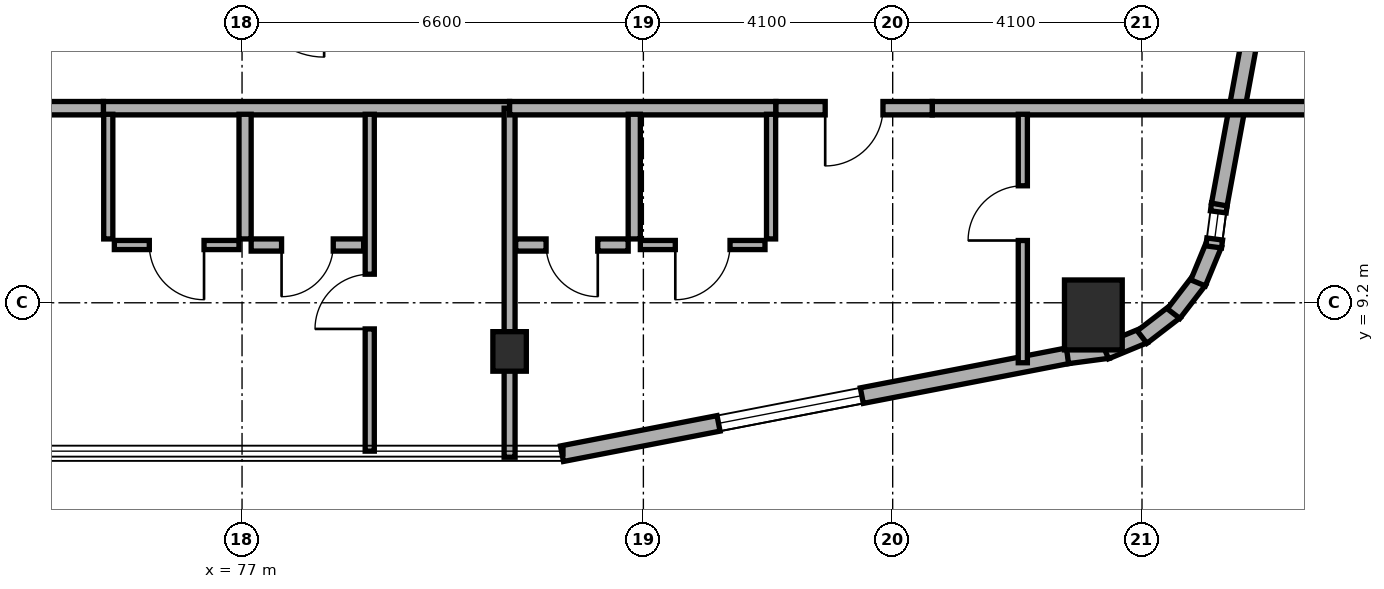
"""IFC4 building model, lengths in metres.
Left out: names, types, materials, properties, quantities, classifications, styles, units other than length and angle.
Written with IfcOpenShell. Run it as: python <this file> out.ifc"""

import sys

from ifc_helpers import new_model, si_unit, direction, frame, frame_2d, origin, origin_2d, place, context, subcontext, project, spatial, rectangle, extrude, element, fill, save


model = new_model("IFC4")
c1 = context("Model", 3, precision=1e-05, world=origin(), true_north=direction((0.0, 1.0)))
c2 = subcontext(c1, "Body", "Model", "MODEL_VIEW")
j1 = project(units=[si_unit("LENGTHUNIT", "METRE"), si_unit("PLANEANGLEUNIT", "RADIAN")], contexts=[c1])
p1 = place(None, origin())
s1 = spatial("IfcSite", under=j1, at=p1, CompositionType="ELEMENT")
p2 = place(p1, origin())
s2 = spatial("IfcBuilding", under=s1, at=p2, CompositionType="ELEMENT")
p3 = place(p2, frame((0.0, 0.0, 127.5)))
s3 = spatial("IfcBuildingStorey", under=s2, at=p3, CompositionType="ELEMENT", Elevation=127.5)
p4 = place(p3, frame((81.4, 8.4, 0.0), z_axis=(0.0, 0.0, 1.0), x_axis=(1.0, 0.0, 0.0)))
e1 = element("IfcColumn", 1, at=p4, inside=s3, PredefinedType="COLUMN", context=c2, shape_type="SweptSolid", body=[
    extrude(rectangle(XDim=0.55, YDim=0.65, at=origin_2d()), origin(), (0.0, 0.0, 1.0), 3.24),
])
p5 = place(p3, frame((91.0, 9.0, 0.0), z_axis=(0.0, 0.0, 1.0), x_axis=(1.0, 0.0, 0.0)))
e2 = element("IfcColumn", 2, at=p5, inside=s3, PredefinedType="COLUMN", context=c2, shape_type="SweptSolid", body=[
    extrude(rectangle(XDim=0.95, YDim=1.15, at=origin_2d()), origin(), (0.0, 0.0, 1.0), 3.24),
])
p6 = place(p3, frame((82.261, 6.718, 0.0), z_axis=(0.0, 0.0, 1.0), x_axis=(0.981750199588, 0.190175039396, 0.0)))
e3 = element("IfcWall", 3, at=p6, inside=s3, PredefinedType="STANDARD", context=c2, shape_type="SweptSolid", body=[
    extrude(rectangle(XDim=8.477, YDim=0.26, at=frame_2d((4.238, 0.0))), origin(), (0.0, 0.0, 1.0), 3.25),
])
p7 = place(p6, frame((2.623, 0.0, 0.8)))
e4 = element("IfcOpeningElement", 4, at=p7, cuts=e3, PredefinedType="OPENING", context=c2, shape_type="SweptSolid", body=[
    extrude(rectangle(XDim=2.4, YDim=1.6, at=frame_2d((1.2, 0.8))), frame((0.0, 0.14, 0.0), z_axis=(0.0, -1.0, 0.0), x_axis=(1.0, 0.0, 0.0)), (0.0, 0.0, 1.0), 0.28),
])
p8 = place(p3, frame((90.575, 8.328, 0.0), z_axis=(0.0, 0.0, 1.0), x_axis=(0.991300187529, 0.13162043232, 0.0)))
e5 = element("IfcWall", 5, at=p8, inside=s3, PredefinedType="STANDARD", context=c2, shape_type="SweptSolid", body=[
    extrude(rectangle(XDim=0.677, YDim=0.26, at=frame_2d((0.338, 0.0))), origin(), (0.0, 0.0, 1.0), 3.25),
])
for number, where, z_axis, x_axis in (
    (6, (91.2, 8.399, 0.0), (0.0, 0.0, 1.0), (0.924, 0.382, 0.0)),
    (7, (91.801, 8.636, 0.0), (0.0, 0.0, 1.0), (0.793, 0.61, 0.0)),
    (8, (92.32, 9.021, 0.0), (0.0, 0.0, 1.0), (0.609, 0.793, 0.0)),
):
    element("IfcWall", number, at=place(p3, frame(where, z_axis=z_axis, x_axis=x_axis)), inside=s3, PredefinedType="STANDARD", context=c2, shape_type="SweptSolid", body=[
        extrude(rectangle(XDim=0.694, YDim=0.26, at=frame_2d((0.347, 0.0))), origin(), (0.0, 0.0, 1.0), 3.25),
    ])
p9 = place(p3, frame((92.722, 9.527, 0.0), z_axis=(0.0, 0.0, 1.0), x_axis=(0.382289608286, 0.924042561464, 0.0)))
e9 = element("IfcWall", 9, at=p9, inside=s3, PredefinedType="STANDARD", context=c2, shape_type="SweptSolid", body=[
    extrude(rectangle(XDim=0.694, YDim=0.26, at=frame_2d((0.347, 0.0))), origin(), (0.0, 0.0, 1.0), 3.25),
])
p10 = place(p3, frame((92.979, 10.119, 0.0), z_axis=(0.0, 0.0, 1.0), x_axis=(0.130614135366, 0.991433279471, 0.0)))
e10 = element("IfcWall", 10, at=p10, inside=s3, PredefinedType="STANDARD", context=c2, shape_type="SweptSolid", body=[
    extrude(rectangle(XDim=0.712, YDim=0.26, at=frame_2d((0.356, 0.0))), origin(), (0.0, 0.0, 1.0), 3.25),
])
p11 = place(p10, frame((0.131, 0.0, 0.85)))
e11 = element("IfcOpeningElement", 11, at=p11, cuts=e10, PredefinedType="OPENING", context=c2, shape_type="SweptSolid", body=[
    extrude(rectangle(XDim=0.45, YDim=1.5, at=frame_2d((0.225, 0.75))), frame((0.0, 0.14, 0.0), z_axis=(0.0, -1.0, 0.0), x_axis=(1.0, 0.0, 0.0)), (0.0, 0.0, 1.0), 0.28),
])
p12 = place(p3, frame((93.071, 10.816, 0.0), z_axis=(0.0, 0.0, 1.0), x_axis=(0.181209963057, 0.983444431215, 0.0)))
e12 = element("IfcWall", 12, at=p12, inside=s3, PredefinedType="STANDARD", context=c2, shape_type="SweptSolid", body=[
    extrude(rectangle(XDim=8.889, YDim=0.26, at=frame_2d((4.445, 0.0))), origin(), (0.0, 0.0, 1.0), 3.25),
])
p13 = place(p12, frame((5.045, 0.0, 0.8)))
e13 = element("IfcOpeningElement", 13, at=p13, cuts=e12, PredefinedType="OPENING", context=c2, shape_type="SweptSolid", body=[
    extrude(rectangle(XDim=2.4, YDim=1.6, at=frame_2d((1.2, 0.8))), frame((0.0, 0.14, 0.0), z_axis=(0.0, -1.0, 0.0), x_axis=(1.0, 0.0, 0.0)), (0.0, 0.0, 1.0), 0.28),
])
p14 = place(p3, frame((74.72, 12.4, 0.0), z_axis=(0.0, 0.0, 1.0), x_axis=(1.0, 0.0, 0.0)))
e14 = element("IfcWall", 14, at=p14, inside=s3, PredefinedType="SOLIDWALL", context=c2, shape_type="SweptSolid", body=[
    extrude(rectangle(XDim=6.68, YDim=0.22, at=frame_2d((3.34, 0.0))), origin(), (0.0, 0.0, 1.0), 3.22),
])
p15 = place(p3, frame((65.85, 12.4, 0.0), z_axis=(0.0, 0.0, 1.0), x_axis=(1.0, 0.0, 0.0)))
e15 = element("IfcWall", 15, at=p15, inside=s3, PredefinedType="SOLIDWALL", context=c2, shape_type="SweptSolid", body=[
    extrude(rectangle(XDim=8.87, YDim=0.22, at=frame_2d((4.435, 0.0))), origin(), (0.0, 0.0, 1.0), 3.22),
])
p16 = place(p15, frame((3.96, 0.0, 0.0)))
e16 = element("IfcOpeningElement", 16, at=p16, cuts=e15, PredefinedType="OPENING", context=c2, shape_type="SweptSolid", body=[
    extrude(rectangle(XDim=0.95, YDim=2.1, at=frame_2d((0.475, 1.05))), frame((0.0, 0.12, 0.0), z_axis=(0.0, -1.0, 0.0), x_axis=(1.0, 0.0, 0.0)), (0.0, 0.0, 1.0), 0.24),
])
p17 = place(p3, frame((79.1, 6.76, 0.0), z_axis=(0.0, 0.0, 1.0), x_axis=(0.0, 1.0, 0.0)))
e17 = element("IfcWall", 17, at=p17, inside=s3, PredefinedType="PARTITIONING", context=c2, shape_type="SweptSolid", body=[
    extrude(rectangle(XDim=5.54, YDim=0.15, at=frame_2d((2.77, 0.0))), origin(), (0.0, 0.0, 1.0), 3.22),
])
p18 = place(p17, frame((2.01, 0.0, 0.0)))
e18 = element("IfcOpeningElement", 18, at=p18, cuts=e17, PredefinedType="OPENING", context=c2, shape_type="SweptSolid", body=[
    extrude(rectangle(XDim=0.9, YDim=2.1, at=frame_2d((0.45, 1.05))), frame((0.0, 0.085, 0.0), z_axis=(0.0, -1.0, 0.0), x_axis=(1.0, 0.0, 0.0)), (0.0, 0.0, 1.0), 0.17),
])
p19 = place(p3, frame((77.05, 10.25, 0.0), z_axis=(0.0, 0.0, 1.0), x_axis=(0.0, 1.0, 0.0)))
e19 = element("IfcWall", 19, at=p19, inside=s3, PredefinedType="PLUMBINGWALL", context=c2, shape_type="SweptSolid", body=[
    extrude(rectangle(XDim=2.05, YDim=0.2, at=frame_2d((1.025, 0.0))), origin(), (0.0, 0.0, 1.0), 3.22),
])
p20 = place(p3, frame((74.8, 10.25, 0.0), z_axis=(0.0, 0.0, 1.0), x_axis=(0.0, 1.0, 0.0)))
e20 = element("IfcWall", 20, at=p20, inside=s3, PredefinedType="PARTITIONING", context=c2, shape_type="SweptSolid", body=[
    extrude(rectangle(XDim=2.05, YDim=0.15, at=frame_2d((1.025, 0.0))), origin(), (0.0, 0.0, 1.0), 3.22),
])
p21 = place(p3, frame((77.15, 10.15, 0.0), z_axis=(0.0, 0.0, 1.0), x_axis=(1.0, 0.0, 0.0)))
e21 = element("IfcWall", 21, at=p21, inside=s3, PredefinedType="PLUMBINGWALL", context=c2, shape_type="SweptSolid", body=[
    extrude(rectangle(XDim=1.85, YDim=0.2, at=frame_2d((0.925, 0.0))), origin(), (0.0, 0.0, 1.0), 3.22),
])
p22 = place(p21, frame((0.5, 0.0, 0.0)))
e22 = element("IfcOpeningElement", 22, at=p22, cuts=e21, PredefinedType="OPENING", context=c2, shape_type="SweptSolid", body=[
    extrude(rectangle(XDim=0.85, YDim=2.1, at=frame_2d((0.425, 1.05))), frame((0.0, 0.11, 0.0), z_axis=(0.0, -1.0, 0.0), x_axis=(1.0, 0.0, 0.0)), (0.0, 0.0, 1.0), 0.22),
])
p23 = place(p3, frame((74.9, 10.15, 0.0), z_axis=(0.0, 0.0, 1.0), x_axis=(1.0, 0.0, 0.0)))
e23 = element("IfcWall", 23, at=p23, inside=s3, PredefinedType="PARTITIONING", context=c2, shape_type="SweptSolid", body=[
    extrude(rectangle(XDim=2.05, YDim=0.15, at=frame_2d((1.025, 0.0))), origin(), (0.0, 0.0, 1.0), 3.22),
])
p24 = place(p23, frame((0.575, 0.0, 0.0)))
e24 = element("IfcOpeningElement", 24, at=p24, cuts=e23, PredefinedType="OPENING", context=c2, shape_type="SweptSolid", body=[
    extrude(rectangle(XDim=0.9, YDim=2.1, at=frame_2d((0.45, 1.05))), frame((0.0, 0.085, 0.0), z_axis=(0.0, -1.0, 0.0), x_axis=(1.0, 0.0, 0.0)), (0.0, 0.0, 1.0), 0.17),
])
p25 = place(p3, frame((81.4, 6.66, 0.0), z_axis=(0.0, 0.0, 1.0), x_axis=(0.0, 1.0, 0.0)))
e25 = element("IfcWall", 25, at=p25, inside=s3, PredefinedType="SOLIDWALL", context=c2, shape_type="SweptSolid", body=[
    extrude(rectangle(XDim=5.74, YDim=0.18, at=frame_2d((2.87, 0.0))), origin(), (0.0, 0.0, 1.0), 3.22),
])
p26 = place(p3, frame((81.4, 12.4, 0.0), z_axis=(0.0, 0.0, 1.0), x_axis=(1.0, 0.0, 0.0)))
e26 = element("IfcWall", 26, at=p26, inside=s3, PredefinedType="SOLIDWALL", context=c2, shape_type="SweptSolid", body=[
    extrude(rectangle(XDim=4.38, YDim=0.22, at=frame_2d((2.19, 0.0))), origin(), (0.0, 0.0, 1.0), 3.22),
])
p27 = place(p3, frame((88.35, 12.4, 0.0), z_axis=(0.0, 0.0, 1.0), x_axis=(1.0, 0.0, 0.0)))
e27 = element("IfcWall", 27, at=p27, inside=s3, PredefinedType="SOLIDWALL", context=c2, shape_type="SweptSolid", body=[
    extrude(rectangle(XDim=6.29, YDim=0.22, at=frame_2d((3.145, 0.0))), origin(), (0.0, 0.0, 1.0), 2.815),
])
p28 = place(p3, frame((85.78, 12.4, 0.0), z_axis=(0.0, 0.0, 1.0), x_axis=(1.0, 0.0, 0.0)))
e28 = element("IfcWall", 28, at=p28, inside=s3, PredefinedType="SOLIDWALL", context=c2, shape_type="SweptSolid", body=[
    extrude(rectangle(XDim=2.57, YDim=0.22, at=frame_2d((1.285, 0.0))), origin(), (0.0, 0.0, 1.0), 3.22),
])
p29 = place(p28, frame((0.81, 0.0, 0.0)))
e29 = element("IfcOpeningElement", 29, at=p29, cuts=e28, PredefinedType="OPENING", context=c2, shape_type="SweptSolid", body=[
    extrude(rectangle(XDim=0.95, YDim=2.1, at=frame_2d((0.475, 1.05))), frame((0.0, 0.12, 0.0), z_axis=(0.0, -1.0, 0.0), x_axis=(1.0, 0.0, 0.0)), (0.0, 0.0, 1.0), 0.24),
])
p30 = place(p3, frame((89.84, 8.214, 0.0), z_axis=(0.0, 0.0, 1.0), x_axis=(0.0, 1.0, 0.0)))
e30 = element("IfcWall", 30, at=p30, inside=s3, PredefinedType="PARTITIONING", context=c2, shape_type="SweptSolid", body=[
    extrude(rectangle(XDim=4.086, YDim=0.15, at=frame_2d((2.043, 0.0))), origin(), (0.0, 0.0, 1.0), 3.22),
])
p31 = place(p30, frame((2.01, 0.0, 0.0)))
e31 = element("IfcOpeningElement", 31, at=p31, cuts=e30, PredefinedType="OPENING", context=c2, shape_type="SweptSolid", body=[
    extrude(rectangle(XDim=0.9, YDim=2.1, at=frame_2d((0.45, 1.05))), frame((0.0, 0.085, 0.0), z_axis=(0.0, -1.0, 0.0), x_axis=(1.0, 0.0, 0.0)), (0.0, 0.0, 1.0), 0.17),
])
p32 = place(p3, frame((83.45, 10.25, 0.0), z_axis=(0.0, 0.0, 1.0), x_axis=(0.0, 1.0, 0.0)))
e32 = element("IfcWall", 32, at=p32, inside=s3, PredefinedType="PLUMBINGWALL", context=c2, shape_type="SweptSolid", body=[
    extrude(rectangle(XDim=2.05, YDim=0.2, at=frame_2d((1.025, 0.0))), origin(), (0.0, 0.0, 1.0), 3.22),
])
p33 = place(p3, frame((85.7, 10.25, 0.0), z_axis=(0.0, 0.0, 1.0), x_axis=(0.0, 1.0, 0.0)))
e33 = element("IfcWall", 33, at=p33, inside=s3, PredefinedType="PARTITIONING", context=c2, shape_type="SweptSolid", body=[
    extrude(rectangle(XDim=2.05, YDim=0.15, at=frame_2d((1.025, 0.0))), origin(), (0.0, 0.0, 1.0), 3.22),
])
p34 = place(p3, frame((81.5, 10.15, 0.0), z_axis=(0.0, 0.0, 1.0), x_axis=(1.0, 0.0, 0.0)))
e34 = element("IfcWall", 34, at=p34, inside=s3, PredefinedType="PLUMBINGWALL", context=c2, shape_type="SweptSolid", body=[
    extrude(rectangle(XDim=1.85, YDim=0.2, at=frame_2d((0.925, 0.0))), origin(), (0.0, 0.0, 1.0), 3.22),
])
p35 = place(p34, frame((0.5, 0.0, 0.0)))
e35 = element("IfcOpeningElement", 35, at=p35, cuts=e34, PredefinedType="OPENING", context=c2, shape_type="SweptSolid", body=[
    extrude(rectangle(XDim=0.85, YDim=2.1, at=frame_2d((0.425, 1.05))), frame((0.0, 0.11, 0.0), z_axis=(0.0, -1.0, 0.0), x_axis=(1.0, 0.0, 0.0)), (0.0, 0.0, 1.0), 0.22),
])
p36 = place(p3, frame((83.55, 10.15, 0.0), z_axis=(0.0, 0.0, 1.0), x_axis=(1.0, 0.0, 0.0)))
e36 = element("IfcWall", 36, at=p36, inside=s3, PredefinedType="PARTITIONING", context=c2, shape_type="SweptSolid", body=[
    extrude(rectangle(XDim=2.05, YDim=0.15, at=frame_2d((1.025, 0.0))), origin(), (0.0, 0.0, 1.0), 3.22),
])
p37 = place(p36, frame((0.575, 0.0, 0.0)))
e37 = element("IfcOpeningElement", 37, at=p37, cuts=e36, PredefinedType="OPENING", context=c2, shape_type="SweptSolid", body=[
    extrude(rectangle(XDim=0.9, YDim=2.1, at=frame_2d((0.45, 1.05))), frame((0.0, 0.085, 0.0), z_axis=(0.0, -1.0, 0.0), x_axis=(1.0, 0.0, 0.0)), (0.0, 0.0, 1.0), 0.17),
])
p38 = place(p7, origin())
e38 = element("IfcWindow", 38, at=p38, inside=s3, PartitioningType="SINGLE_PANEL", PredefinedType="WINDOW", context=c2, shape_type="SweptSolid", body=[
    extrude(rectangle(XDim=2.4, YDim=1.6, at=frame_2d((1.2, 0.8))), frame((0.0, 0.03, 0.0), z_axis=(0.0, -1.0, 0.0), x_axis=(1.0, 0.0, 0.0)), (0.0, 0.0, 1.0), 0.06),
])
fill(e4, e38)
p39 = place(p11, origin())
e39 = element("IfcWindow", 39, at=p39, inside=s3, PartitioningType="SINGLE_PANEL", PredefinedType="WINDOW", context=c2, shape_type="SweptSolid", body=[
    extrude(rectangle(XDim=0.45, YDim=1.5, at=frame_2d((0.225, 0.75))), frame((0.0, 0.03, 0.0), z_axis=(0.0, -1.0, 0.0), x_axis=(1.0, 0.0, 0.0)), (0.0, 0.0, 1.0), 0.06),
])
fill(e11, e39)
p40 = place(p18, origin())
e40 = element("IfcDoor", 40, at=p40, inside=s3, OperationType="SINGLE_SWING_LEFT", PredefinedType="DOOR", context=c2, shape_type="SweptSolid", body=[
    extrude(rectangle(XDim=0.9, YDim=2.1, at=frame_2d((0.45, 1.05))), frame((0.0, 0.025, 0.0), z_axis=(0.0, -1.0, 0.0), x_axis=(1.0, 0.0, 0.0)), (0.0, 0.0, 1.0), 0.05),
])
fill(e18, e40)
p41 = place(p22, frame((0.85, 0.0, 0.0), z_axis=(0.0, 0.0, 1.0), x_axis=(-1.0, 0.0, 0.0)))
e41 = element("IfcDoor", 41, at=p41, inside=s3, OperationType="SINGLE_SWING_RIGHT", PredefinedType="DOOR", context=c2, shape_type="SweptSolid", body=[
    extrude(rectangle(XDim=0.85, YDim=2.1, at=frame_2d((0.425, 1.05))), frame((0.0, 0.025, 0.0), z_axis=(0.0, -1.0, 0.0), x_axis=(1.0, 0.0, 0.0)), (0.0, 0.0, 1.0), 0.05),
])
fill(e22, e41)
p42 = place(p24, frame((0.9, 0.0, 0.0), z_axis=(0.0, 0.0, 1.0), x_axis=(-1.0, 0.0, 0.0)))
e42 = element("IfcDoor", 42, at=p42, inside=s3, OperationType="SINGLE_SWING_LEFT", PredefinedType="DOOR", context=c2, shape_type="SweptSolid", body=[
    extrude(rectangle(XDim=0.9, YDim=2.1, at=frame_2d((0.45, 1.05))), frame((0.0, 0.025, 0.0), z_axis=(0.0, -1.0, 0.0), x_axis=(1.0, 0.0, 0.0)), (0.0, 0.0, 1.0), 0.05),
])
fill(e24, e42)
p43 = place(p29, frame((0.95, 0.0, 0.0), z_axis=(0.0, 0.0, 1.0), x_axis=(-1.0, 0.0, 0.0)))
e43 = element("IfcDoor", 43, at=p43, inside=s3, OperationType="SINGLE_SWING_RIGHT", PredefinedType="DOOR", context=c2, shape_type="SweptSolid", body=[
    extrude(rectangle(XDim=0.95, YDim=2.1, at=frame_2d((0.475, 1.05))), frame((0.0, 0.025, 0.0), z_axis=(0.0, -1.0, 0.0), x_axis=(1.0, 0.0, 0.0)), (0.0, 0.0, 1.0), 0.05),
])
fill(e29, e43)
p44 = place(p31, origin())
e44 = element("IfcDoor", 44, at=p44, inside=s3, OperationType="SINGLE_SWING_LEFT", PredefinedType="DOOR", context=c2, shape_type="SweptSolid", body=[
    extrude(rectangle(XDim=0.9, YDim=2.1, at=frame_2d((0.45, 1.05))), frame((0.0, 0.025, 0.0), z_axis=(0.0, -1.0, 0.0), x_axis=(1.0, 0.0, 0.0)), (0.0, 0.0, 1.0), 0.05),
])
fill(e31, e44)
p45 = place(p35, frame((0.85, 0.0, 0.0), z_axis=(0.0, 0.0, 1.0), x_axis=(-1.0, 0.0, 0.0)))
e45 = element("IfcDoor", 45, at=p45, inside=s3, OperationType="SINGLE_SWING_LEFT", PredefinedType="DOOR", context=c2, shape_type="SweptSolid", body=[
    extrude(rectangle(XDim=0.85, YDim=2.1, at=frame_2d((0.425, 1.05))), frame((0.0, 0.025, 0.0), z_axis=(0.0, -1.0, 0.0), x_axis=(1.0, 0.0, 0.0)), (0.0, 0.0, 1.0), 0.05),
])
fill(e35, e45)
p46 = place(p37, frame((0.9, 0.0, 0.0), z_axis=(0.0, 0.0, 1.0), x_axis=(-1.0, 0.0, 0.0)))
e46 = element("IfcDoor", 46, at=p46, inside=s3, OperationType="SINGLE_SWING_RIGHT", PredefinedType="DOOR", context=c2, shape_type="SweptSolid", body=[
    extrude(rectangle(XDim=0.9, YDim=2.1, at=frame_2d((0.45, 1.05))), frame((0.0, 0.025, 0.0), z_axis=(0.0, -1.0, 0.0), x_axis=(1.0, 0.0, 0.0)), (0.0, 0.0, 1.0), 0.05),
])
fill(e37, e46)
save(model, sys.argv[1])
